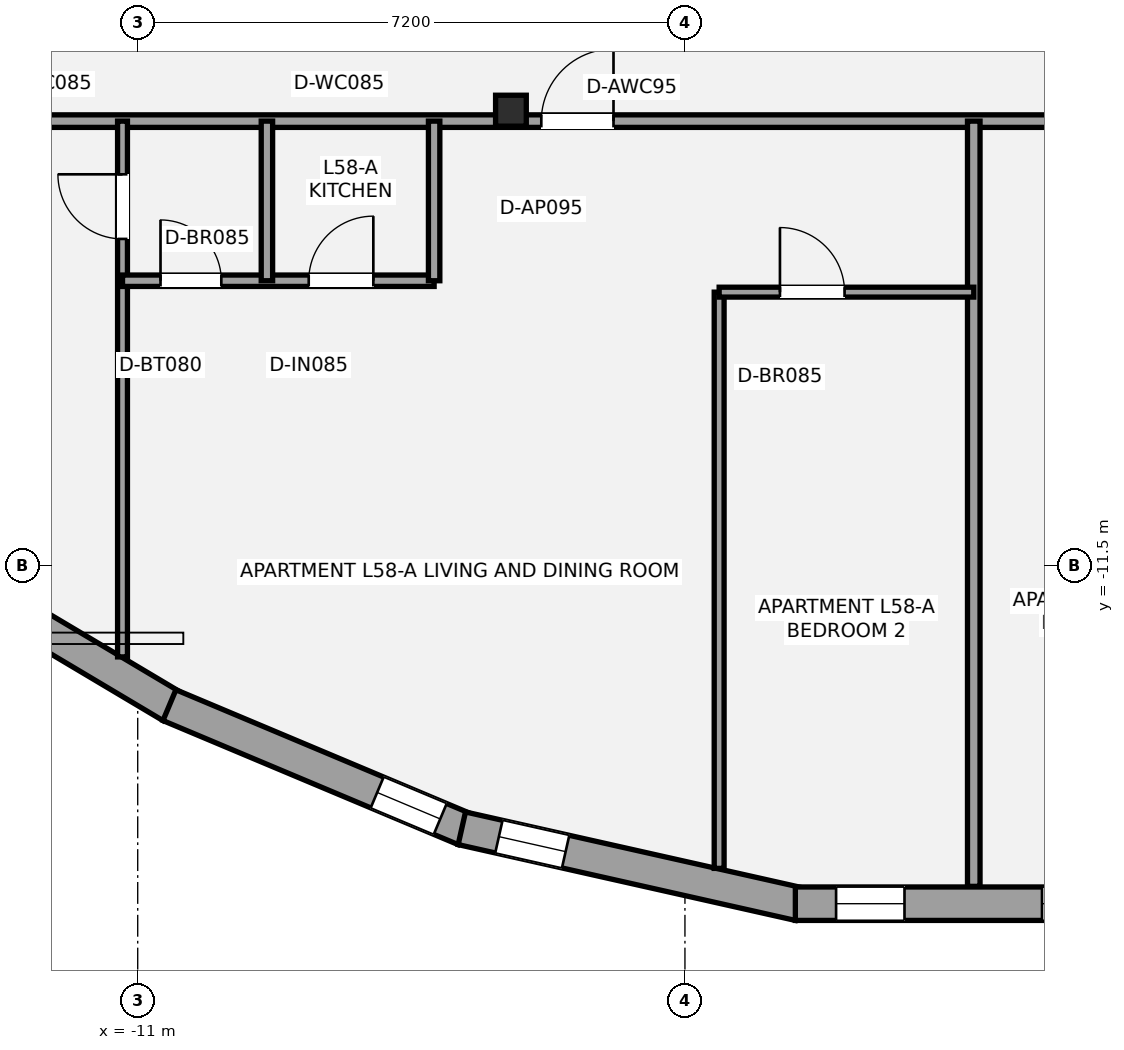
"""IFC4 building model, lengths in metres.
Left out: names, types, materials, properties, quantities, classifications, styles, units other than length and angle.
Written with IfcOpenShell. Run it as: python <this file> out.ifc"""

import sys

from ifc_helpers import new_model, si_unit, direction, frame, frame_2d, origin, origin_2d, place, context, subcontext, project, spatial, rectangle, i_section, extrude, element, fill, save


model = new_model("IFC4")
c1 = context("Model", 3, precision=1e-05, world=origin(), true_north=direction((0.0, 1.0)))
c2 = subcontext(c1, "Body", "Model", "MODEL_VIEW")
j1 = project(units=[si_unit("LENGTHUNIT", "METRE"), si_unit("PLANEANGLEUNIT", "RADIAN")], contexts=[c1])
p1 = place(None, origin())
s1 = spatial("IfcSite", under=j1, at=p1, CompositionType="ELEMENT")
p2 = place(p1, origin())
s2 = spatial("IfcBuilding", under=s1, at=p2, CompositionType="ELEMENT")
p3 = place(p2, frame((0.0, 0.0, 210.0)))
s3 = spatial("IfcBuildingStorey", under=s2, at=p3, CompositionType="ELEMENT", Elevation=210.0)
p4 = place(p3, frame((-6.09, -5.513, 0.0), z_axis=(0.0, 0.0, 1.0), x_axis=(1.0, 0.0, 0.0)))
e1 = element("IfcColumn", 1, at=p4, inside=s3, PredefinedType="COLUMN", context=c2, shape_type="SweptSolid", body=[
    extrude(i_section(OverallWidth=0.404, OverallDepth=0.407, WebThickness=0.027, FlangeThickness=0.044, at=origin_2d()), origin(), (0.0, 0.0, 1.0), 3.15),
])
p5 = place(p3, frame((-10.555, -13.348, 0.0), z_axis=(0.0, 0.0, 1.0), x_axis=(-0.859415840392, 0.511277237204, 0.0)))
e2 = element("IfcWall", 2, at=p5, inside=s3, PredefinedType="STANDARD", context=c2, shape_type="SweptSolid", body=[
    extrude(rectangle(XDim=3.864, YDim=0.44, at=frame_2d((1.932, 0.0))), origin(), (0.0, 0.0, 1.0), 2.336),
])
p6 = place(p5, frame((2.764, 0.0, 0.58)))
e3 = element("IfcOpeningElement", 3, at=p6, cuts=e2, PredefinedType="OPENING", context=c2, shape_type="SweptSolid", body=[
    extrude(rectangle(XDim=0.9, YDim=1.35, at=frame_2d((0.45, 0.675))), frame((0.0, 0.23, 0.0), z_axis=(0.0, -1.0, 0.0), x_axis=(1.0, 0.0, 0.0)), (0.0, 0.0, 1.0), 0.46),
])
p7 = place(p3, frame((-6.699, -14.966, 0.0), z_axis=(0.0, 0.0, 1.0), x_axis=(-0.921948168537, 0.387313276988, 0.0)))
e4 = element("IfcWall", 4, at=p7, inside=s3, PredefinedType="STANDARD", context=c2, shape_type="SweptSolid", body=[
    extrude(rectangle(XDim=4.213, YDim=0.44, at=frame_2d((2.106, 0.0))), origin(), (0.0, 0.0, 1.0), 2.336),
])
p8 = place(p7, frame((0.348, 0.0, 0.58)))
e5 = element("IfcOpeningElement", 5, at=p8, cuts=e4, PredefinedType="OPENING", context=c2, shape_type="SweptSolid", body=[
    extrude(rectangle(XDim=0.9, YDim=1.35, at=frame_2d((0.45, 0.675))), frame((0.0, 0.23, 0.0), z_axis=(0.0, -1.0, 0.0), x_axis=(1.0, 0.0, 0.0)), (0.0, 0.0, 1.0), 0.46),
])
p9 = place(p3, frame((-2.299, -15.951, 0.0), z_axis=(0.0, 0.0, 1.0), x_axis=(-0.97564079092, 0.219374217021, 0.0)))
e6 = element("IfcWall", 6, at=p9, inside=s3, PredefinedType="STANDARD", context=c2, shape_type="SweptSolid", body=[
    extrude(rectangle(XDim=4.547, YDim=0.44, at=frame_2d((2.274, 0.0))), origin(), (0.0, 0.0, 1.0), 2.336),
])
p10 = place(p9, frame((3.147, 0.0, 0.58)))
e7 = element("IfcOpeningElement", 7, at=p10, cuts=e6, PredefinedType="OPENING", context=c2, shape_type="SweptSolid", body=[
    extrude(rectangle(XDim=0.9, YDim=1.35, at=frame_2d((0.45, 0.675))), frame((0.0, 0.23, 0.0), z_axis=(0.0, -1.0, 0.0), x_axis=(1.0, 0.0, 0.0)), (0.0, 0.0, 1.0), 0.46),
])
p11 = place(p3, frame((2.347, -15.946, 0.0), z_axis=(0.0, 0.0, 1.0), x_axis=(-1.0, 0.0, 0.0)))
e8 = element("IfcWall", 8, at=p11, inside=s3, PredefinedType="STANDARD", context=c2, shape_type="SweptSolid", body=[
    extrude(rectangle(XDim=4.695, YDim=0.44, at=frame_2d((2.347, 0.0))), origin(), (0.0, 0.0, 1.0), 2.336),
])
p12 = place(p11, frame((0.55, 0.0, 0.58)))
e9 = element("IfcOpeningElement", 9, at=p12, cuts=e8, PredefinedType="OPENING", context=c2, shape_type="SweptSolid", body=[
    extrude(rectangle(XDim=0.9, YDim=1.35, at=frame_2d((0.45, 0.675))), frame((0.0, 0.23, 0.0), z_axis=(0.0, -1.0, 0.0), x_axis=(1.0, 0.0, 0.0)), (0.0, 0.0, 1.0), 0.46),
])
p13 = place(p11, frame((3.259, 0.0, 0.58)))
e10 = element("IfcOpeningElement", 10, at=p13, cuts=e8, PredefinedType="OPENING", context=c2, shape_type="SweptSolid", body=[
    extrude(rectangle(XDim=0.9, YDim=1.35, at=frame_2d((0.45, 0.675))), frame((0.0, 0.23, 0.0), z_axis=(0.0, -1.0, 0.0), x_axis=(1.0, 0.0, 0.0)), (0.0, 0.0, 1.0), 0.46),
])
p14 = place(p3, frame((-20.799, -5.65, 0.0), z_axis=(0.0, 0.0, 1.0), x_axis=(1.0, 0.0, 0.0)))
e11 = element("IfcWall", 11, at=p14, inside=s3, PredefinedType="PARTITIONING", context=c2, shape_type="SweptSolid", body=[
    extrude(rectangle(XDim=41.598, YDim=0.165, at=frame_2d((20.799, 0.0))), origin(), (0.0, 0.0, 1.0), 2.357),
])
p15 = place(p14, frame((1.62, 0.0, 0.0)))
e12 = element("IfcOpeningElement", 12, at=p15, cuts=e11, PredefinedType="OPENING", context=c2, shape_type="SweptSolid", body=[
    extrude(rectangle(XDim=1.0, YDim=2.15, at=frame_2d((0.5, 1.075))), frame((0.0, 0.093, 0.0), z_axis=(0.0, -1.0, 0.0), x_axis=(1.0, 0.0, 0.0)), (0.0, 0.0, 1.0), 0.185),
])
p16 = place(p14, frame((38.978, 0.0, 0.0)))
e13 = element("IfcOpeningElement", 13, at=p16, cuts=e11, PredefinedType="OPENING", context=c2, shape_type="SweptSolid", body=[
    extrude(rectangle(XDim=1.0, YDim=2.15, at=frame_2d((0.5, 1.075))), frame((0.0, 0.093, 0.0), z_axis=(0.0, -1.0, 0.0), x_axis=(1.0, 0.0, 0.0)), (0.0, 0.0, 1.0), 0.185),
])
p17 = place(p14, frame((15.109, 0.0, 0.0)))
e14 = element("IfcOpeningElement", 14, at=p17, cuts=e11, PredefinedType="OPENING", context=c2, shape_type="SweptSolid", body=[
    extrude(rectangle(XDim=0.95, YDim=2.15, at=frame_2d((0.475, 1.075))), frame((0.0, 0.093, 0.0), z_axis=(0.0, -1.0, 0.0), x_axis=(1.0, 0.0, 0.0)), (0.0, 0.0, 1.0), 0.185),
])
p18 = place(p14, frame((28.699, 0.0, 0.0)))
e15 = element("IfcOpeningElement", 15, at=p18, cuts=e11, PredefinedType="OPENING", context=c2, shape_type="SweptSolid", body=[
    extrude(rectangle(XDim=0.95, YDim=2.15, at=frame_2d((0.475, 1.075))), frame((0.0, 0.093, 0.0), z_axis=(0.0, -1.0, 0.0), x_axis=(1.0, 0.0, 0.0)), (0.0, 0.0, 1.0), 0.185),
])
p19 = place(p3, frame((0.0, -15.718, 0.0), z_axis=(0.0, 0.0, 1.0), x_axis=(0.0, 1.0, 0.0)))
e16 = element("IfcWall", 16, at=p19, inside=s3, PredefinedType="PARTITIONING", context=c2, shape_type="SweptSolid", body=[
    extrude(rectangle(XDim=10.068, YDim=0.165, at=frame_2d((5.034, 0.0))), origin(), (0.0, 0.0, 1.0), 2.423),
])
p20 = place(p3, frame((-11.2, -12.699, 0.0), z_axis=(0.0, 0.0, 1.0), x_axis=(0.0, 1.0, 0.0)))
e17 = element("IfcWall", 17, at=p20, inside=s3, PredefinedType="PARTITIONING", context=c2, shape_type="SweptSolid", body=[
    extrude(rectangle(XDim=7.049, YDim=0.13, at=frame_2d((3.524, 0.0))), origin(), (0.0, 0.0, 1.0), 2.423),
])
p21 = place(p20, frame((5.499, 0.0, 0.0)))
e18 = element("IfcOpeningElement", 18, at=p21, cuts=e17, PredefinedType="OPENING", context=c2, shape_type="SweptSolid", body=[
    extrude(rectangle(XDim=0.85, YDim=2.1, at=frame_2d((0.425, 1.05))), frame((0.0, 0.075, 0.0), z_axis=(0.0, -1.0, 0.0), x_axis=(1.0, 0.0, 0.0)), (0.0, 0.0, 1.0), 0.15),
])
p22 = place(p3, frame((-11.2, -7.75, 0.0), z_axis=(0.0, 0.0, 1.0), x_axis=(1.0, 0.0, 0.0)))
e19 = element("IfcWall", 19, at=p22, inside=s3, PredefinedType="PLUMBINGWALL", context=c2, shape_type="SweptSolid", body=[
    extrude(rectangle(XDim=4.1, YDim=0.15, at=frame_2d((2.05, 0.0))), origin(), (0.0, 0.0, 1.0), 2.423),
])
p23 = place(p22, frame((0.5, 0.0, 0.0)))
e20 = element("IfcOpeningElement", 20, at=p23, cuts=e19, PredefinedType="OPENING", context=c2, shape_type="SweptSolid", body=[
    extrude(rectangle(XDim=0.8, YDim=2.1, at=frame_2d((0.4, 1.05))), frame((0.0, 0.085, 0.0), z_axis=(0.0, -1.0, 0.0), x_axis=(1.0, 0.0, 0.0)), (0.0, 0.0, 1.0), 0.17),
])
p24 = place(p22, frame((2.45, 0.0, 0.0)))
e21 = element("IfcOpeningElement", 21, at=p24, cuts=e19, PredefinedType="OPENING", context=c2, shape_type="SweptSolid", body=[
    extrude(rectangle(XDim=0.85, YDim=2.1, at=frame_2d((0.425, 1.05))), frame((0.0, 0.085, 0.0), z_axis=(0.0, -1.0, 0.0), x_axis=(1.0, 0.0, 0.0)), (0.0, 0.0, 1.0), 0.17),
])
p25 = place(p3, frame((-9.3, -7.75, 0.0), z_axis=(0.0, 0.0, 1.0), x_axis=(0.0, 1.0, 0.0)))
e22 = element("IfcWall", 22, at=p25, inside=s3, PredefinedType="PLUMBINGWALL", context=c2, shape_type="SweptSolid", body=[
    extrude(rectangle(XDim=2.1, YDim=0.15, at=frame_2d((1.05, 0.0))), origin(), (0.0, 0.0, 1.0), 2.97),
])
p26 = place(p3, frame((-7.1, -7.75, 0.0), z_axis=(0.0, 0.0, 1.0), x_axis=(0.0, 1.0, 0.0)))
e23 = element("IfcWall", 23, at=p26, inside=s3, PredefinedType="PLUMBINGWALL", context=c2, shape_type="SweptSolid", body=[
    extrude(rectangle(XDim=2.1, YDim=0.15, at=frame_2d((1.05, 0.0))), origin(), (0.0, 0.0, 1.0), 2.423),
])
p27 = place(p3, frame((-3.35, -15.481, 0.0), z_axis=(0.0, 0.0, 1.0), x_axis=(0.0, 1.0, 0.0)))
e24 = element("IfcWall", 24, at=p27, inside=s3, PredefinedType="PARTITIONING", context=c2, shape_type="SweptSolid", body=[
    extrude(rectangle(XDim=7.581, YDim=0.13, at=frame_2d((3.791, 0.0))), origin(), (0.0, 0.0, 1.0), 2.423),
])
p28 = place(p3, frame((-3.35, -7.9, 0.0), z_axis=(0.0, 0.0, 1.0), x_axis=(1.0, 0.0, 0.0)))
e25 = element("IfcWall", 25, at=p28, inside=s3, PredefinedType="PARTITIONING", context=c2, shape_type="SweptSolid", body=[
    extrude(rectangle(XDim=3.35, YDim=0.13, at=frame_2d((1.675, 0.0))), origin(), (0.0, 0.0, 1.0), 2.423),
])
p29 = place(p28, frame((0.8, 0.0, 0.0)))
e26 = element("IfcOpeningElement", 26, at=p29, cuts=e25, PredefinedType="OPENING", context=c2, shape_type="SweptSolid", body=[
    extrude(rectangle(XDim=0.85, YDim=2.1, at=frame_2d((0.425, 1.05))), frame((0.0, 0.075, 0.0), z_axis=(0.0, -1.0, 0.0), x_axis=(1.0, 0.0, 0.0)), (0.0, 0.0, 1.0), 0.15),
])
p30 = place(p8, origin())
e27 = element("IfcWindow", 27, at=p30, inside=s3, PartitioningType="SINGLE_PANEL", PredefinedType="WINDOW", context=c2, shape_type="SweptSolid", body=[
    extrude(rectangle(XDim=0.9, YDim=1.35, at=frame_2d((0.45, 0.675))), frame((0.0, -0.01, 0.0), z_axis=(0.0, -1.0, 0.0), x_axis=(1.0, 0.0, 0.0)), (0.0, 0.0, 1.0), 0.06),
])
fill(e5, e27)
p31 = place(p10, origin())
e28 = element("IfcWindow", 28, at=p31, inside=s3, PartitioningType="SINGLE_PANEL", PredefinedType="WINDOW", context=c2, shape_type="SweptSolid", body=[
    extrude(rectangle(XDim=0.9, YDim=1.35, at=frame_2d((0.45, 0.675))), frame((0.0, -0.01, 0.0), z_axis=(0.0, -1.0, 0.0), x_axis=(1.0, 0.0, 0.0)), (0.0, 0.0, 1.0), 0.06),
])
fill(e7, e28)
p32 = place(p12, origin())
e29 = element("IfcWindow", 29, at=p32, inside=s3, PartitioningType="SINGLE_PANEL", PredefinedType="WINDOW", context=c2, shape_type="SweptSolid", body=[
    extrude(rectangle(XDim=0.9, YDim=1.35, at=frame_2d((0.45, 0.675))), frame((0.0, -0.01, 0.0), z_axis=(0.0, -1.0, 0.0), x_axis=(1.0, 0.0, 0.0)), (0.0, 0.0, 1.0), 0.06),
])
fill(e9, e29)
p33 = place(p13, origin())
e30 = element("IfcWindow", 30, at=p33, inside=s3, PartitioningType="SINGLE_PANEL", PredefinedType="WINDOW", context=c2, shape_type="SweptSolid", body=[
    extrude(rectangle(XDim=0.9, YDim=1.35, at=frame_2d((0.45, 0.675))), frame((0.0, -0.01, 0.0), z_axis=(0.0, -1.0, 0.0), x_axis=(1.0, 0.0, 0.0)), (0.0, 0.0, 1.0), 0.06),
])
fill(e10, e30)
p34 = place(p21, origin())
e31 = element("IfcDoor", 31, at=p34, inside=s3, OperationType="SINGLE_SWING_RIGHT", PredefinedType="DOOR", context=c2, shape_type="SweptSolid", body=[
    extrude(rectangle(XDim=0.85, YDim=2.1, at=frame_2d((0.425, 1.05))), frame((0.0, 0.025, 0.0), z_axis=(0.0, -1.0, 0.0), x_axis=(1.0, 0.0, 0.0)), (0.0, 0.0, 1.0), 0.05),
])
fill(e18, e31)
p35 = place(p23, origin())
e32 = element("IfcDoor", 32, at=p35, inside=s3, OperationType="SINGLE_SWING_LEFT", PredefinedType="DOOR", context=c2, shape_type="SweptSolid", body=[
    extrude(rectangle(XDim=0.8, YDim=2.1, at=frame_2d((0.4, 1.05))), frame((0.0, 0.025, 0.0), z_axis=(0.0, -1.0, 0.0), x_axis=(1.0, 0.0, 0.0)), (0.0, 0.0, 1.0), 0.05),
])
fill(e20, e32)
p36 = place(p24, origin())
e33 = element("IfcDoor", 33, at=p36, inside=s3, OperationType="SINGLE_SWING_RIGHT", PredefinedType="DOOR", context=c2, shape_type="SweptSolid", body=[
    extrude(rectangle(XDim=0.85, YDim=2.1, at=frame_2d((0.425, 1.05))), frame((0.0, 0.025, 0.0), z_axis=(0.0, -1.0, 0.0), x_axis=(1.0, 0.0, 0.0)), (0.0, 0.0, 1.0), 0.05),
])
fill(e21, e33)
p37 = place(p17, origin())
e34 = element("IfcDoor", 34, at=p37, inside=s3, OperationType="SINGLE_SWING_RIGHT", PredefinedType="DOOR", context=c2, shape_type="SweptSolid", body=[
    extrude(rectangle(XDim=0.95, YDim=2.15, at=frame_2d((0.475, 1.075))), frame((0.0, 0.025, 0.0), z_axis=(0.0, -1.0, 0.0), x_axis=(1.0, 0.0, 0.0)), (0.0, 0.0, 1.0), 0.05),
])
fill(e14, e34)
p38 = place(p29, origin())
e35 = element("IfcDoor", 35, at=p38, inside=s3, OperationType="SINGLE_SWING_LEFT", PredefinedType="DOOR", context=c2, shape_type="SweptSolid", body=[
    extrude(rectangle(XDim=0.85, YDim=2.1, at=frame_2d((0.425, 1.05))), frame((0.0, 0.025, 0.0), z_axis=(0.0, -1.0, 0.0), x_axis=(1.0, 0.0, 0.0)), (0.0, 0.0, 1.0), 0.05),
])
fill(e26, e35)
save(model, sys.argv[1])
